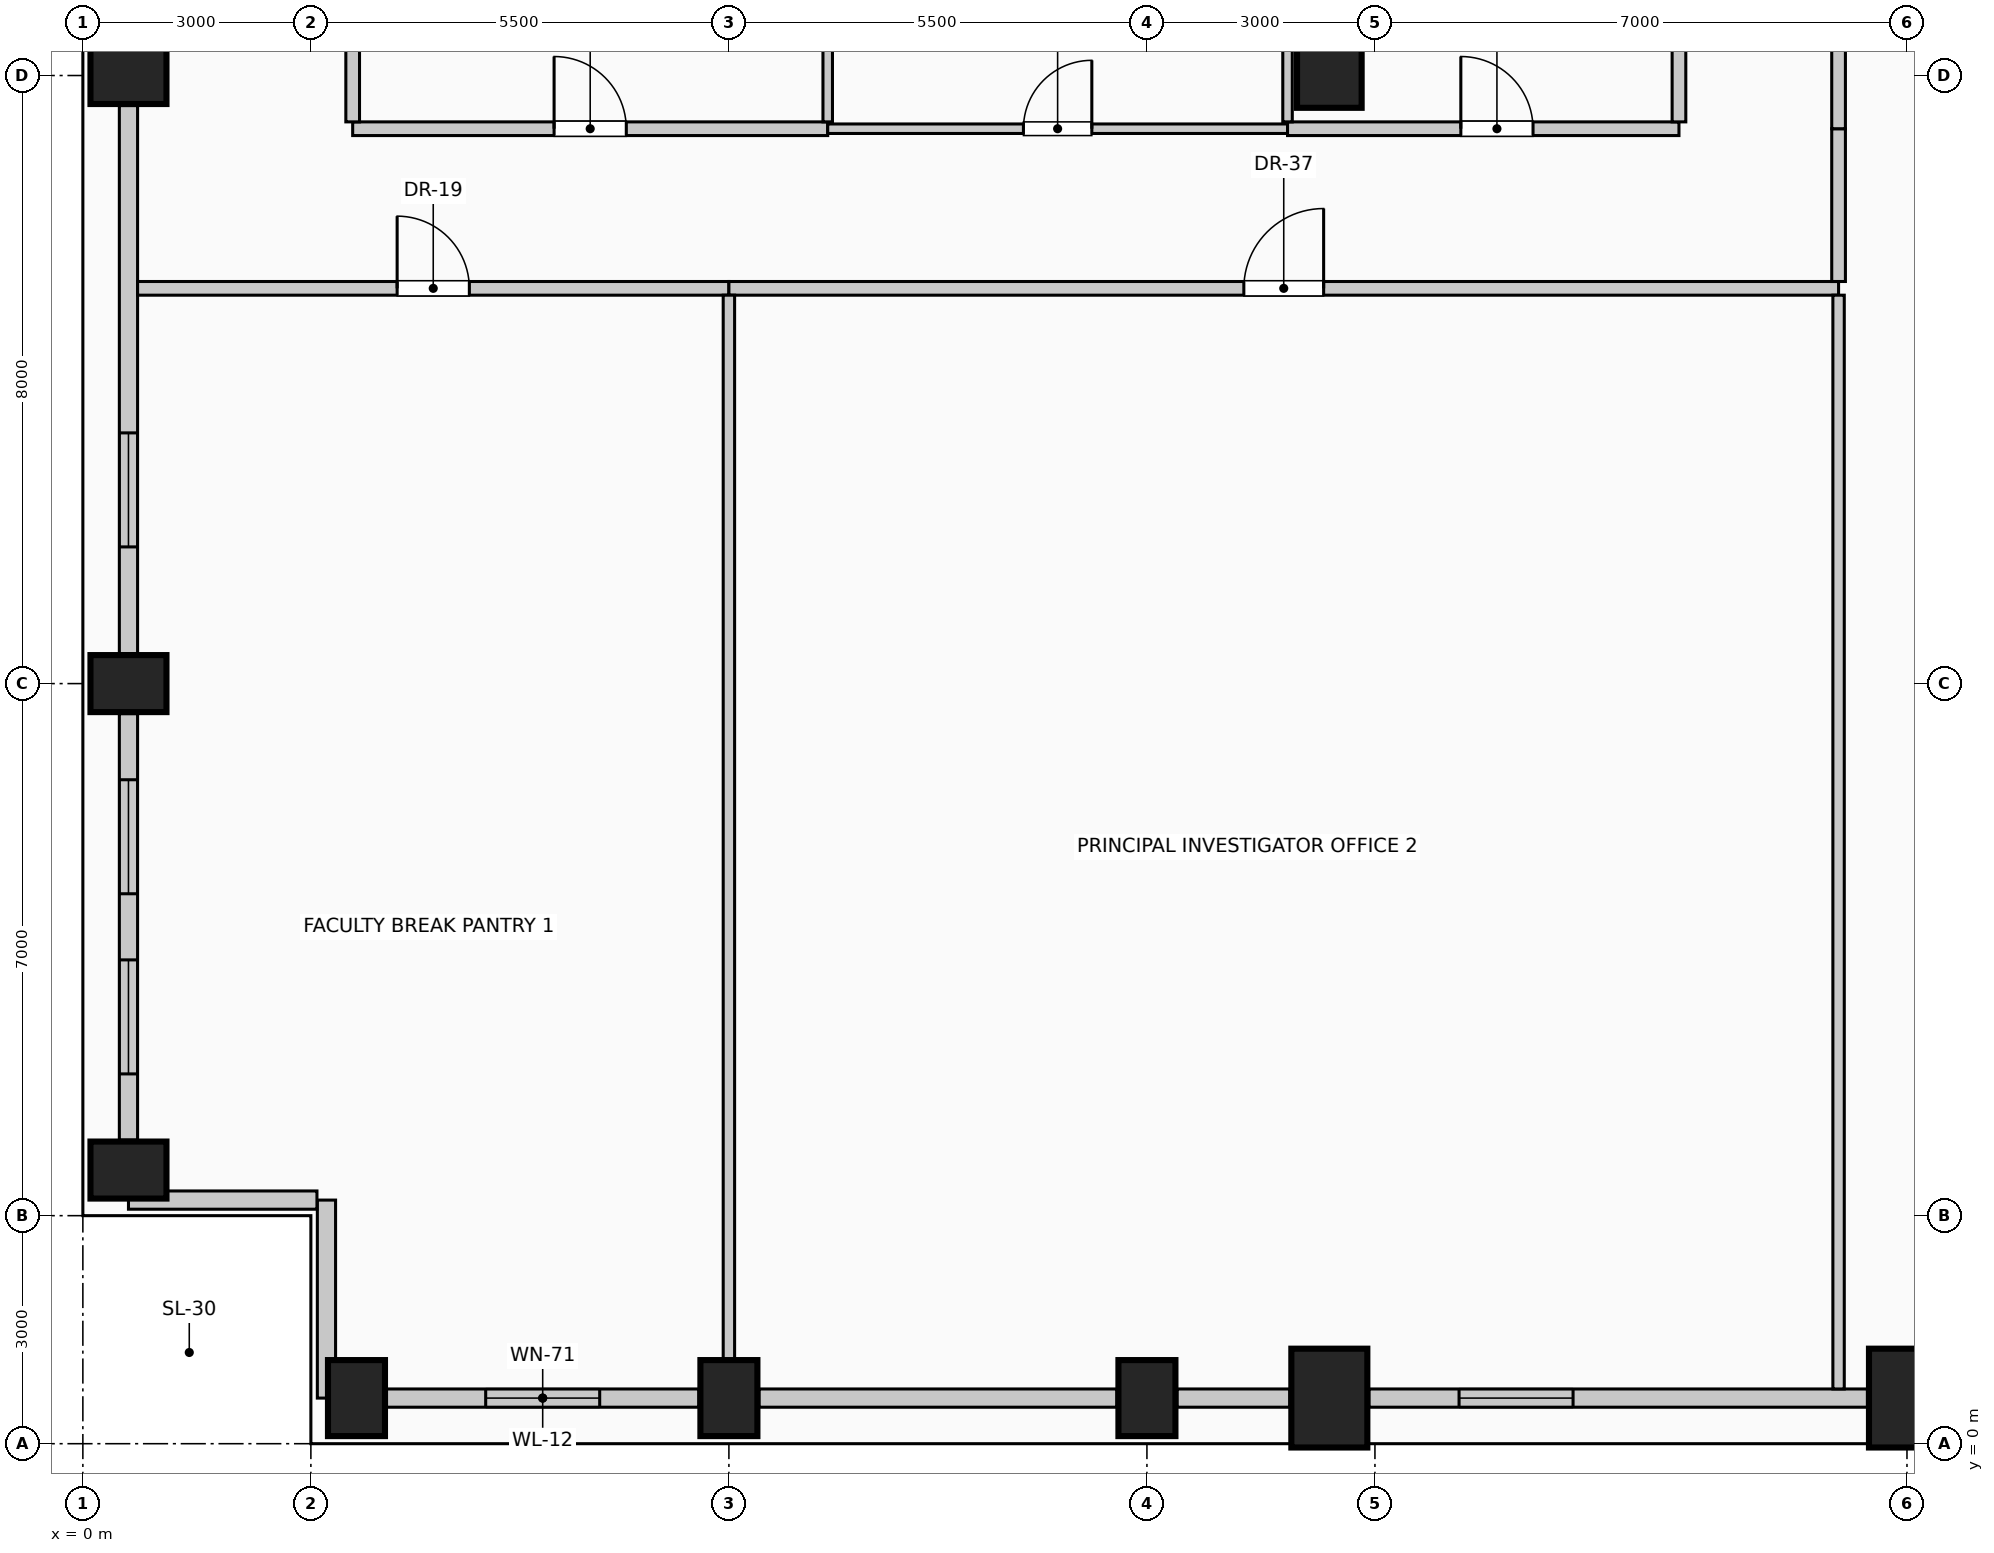
"""IFC4 building model, lengths in metres.
Left out: names, types, materials, properties, quantities, classifications, styles, units other than length and angle.
Written with IfcOpenShell. Run it as: python <this file> out.ifc"""

import sys

from ifc_helpers import new_model, si_unit, direction, frame, frame_2d, origin, origin_2d, place, context, subcontext, project, spatial, rectangle, circle, extrude, element, fill, save


model = new_model("IFC4")
c1 = context("Model", 3, precision=1e-05, world=origin(), true_north=direction((0.0, 1.0)))
c2 = subcontext(c1, "Body", "Model", "MODEL_VIEW")
j1 = project(units=[si_unit("LENGTHUNIT", "METRE"), si_unit("PLANEANGLEUNIT", "RADIAN")], contexts=[c1])
p1 = place(None, origin())
s1 = spatial("IfcSite", under=j1, at=p1, CompositionType="ELEMENT")
p2 = place(p1, origin())
s2 = spatial("IfcBuilding", under=s1, at=p2, CompositionType="ELEMENT")
p3 = place(p2, frame((0.0, 0.0, 226.6)))
s3 = spatial("IfcBuildingStorey", under=s2, at=p3, CompositionType="ELEMENT", Elevation=226.6)
for number, where, z_axis, x_axis in (
    (1, (3.6, 0.6, 0.0), (0.0, 0.0, 1.0), (1.0, 0.0, 0.0)),
    (2, (8.5, 0.6, 0.0), (0.0, 0.0, 1.0), (1.0, 0.0, 0.0)),
    (3, (14.0, 0.6, 0.0), (0.0, 0.0, 1.0), (1.0, 0.0, 0.0)),
):
    element("IfcColumn", number, at=place(p3, frame(where, z_axis=z_axis, x_axis=x_axis)), inside=s3, PredefinedType="COLUMN", context=c2, shape_type="SweptSolid", body=[
        extrude(rectangle(XDim=0.75, YDim=1.0, at=origin_2d()), origin(), (0.0, 0.0, 1.0), 4.0),
    ])
for number, where, z_axis, x_axis in (
    (4, (16.4, 0.6, 0.0), (0.0, 0.0, 1.0), (1.0, 0.0, 0.0)),
    (5, (24.0, 0.6, 0.0), (0.0, 0.0, 1.0), (1.0, 0.0, 0.0)),
):
    element("IfcColumn", number, at=place(p3, frame(where, z_axis=z_axis, x_axis=x_axis)), inside=s3, PredefinedType="COLUMN", context=c2, shape_type="SweptSolid", body=[
        extrude(rectangle(XDim=1.0, YDim=1.3, at=origin_2d()), origin(), (0.0, 0.0, 1.0), 4.0),
    ])
for number, where, z_axis, x_axis in (
    (6, (0.6, 3.6, 0.0), (0.0, 0.0, 1.0), (0.0, 1.0, 0.0)),
    (7, (0.6, 10.0, 0.0), (0.0, 0.0, 1.0), (0.0, 1.0, 0.0)),
    (8, (0.6, 18.0, 0.0), (0.0, 0.0, 1.0), (0.0, 1.0, 0.0)),
):
    element("IfcColumn", number, at=place(p3, frame(where, z_axis=z_axis, x_axis=x_axis)), inside=s3, PredefinedType="COLUMN", context=c2, shape_type="SweptSolid", body=[
        extrude(rectangle(XDim=0.75, YDim=1.0, at=origin_2d()), origin(), (0.0, 0.0, 1.0), 4.0),
    ])
p4 = place(p3, frame((16.4, 18.0, 0.0), z_axis=(0.0, 0.0, 1.0), x_axis=(1.0, 0.0, 0.0)))
e9 = element("IfcColumn", 9, at=p4, inside=s3, PredefinedType="COLUMN", context=c2, shape_type="SweptSolid", body=[
    extrude(circle(Radius=0.425, at=origin_2d()), origin(), (0.0, 0.0, 1.0), 4.0),
])
p5 = place(p3, frame((8.105, 0.6, 0.0), z_axis=(0.0, 0.0, 1.0), x_axis=(-1.0, 0.0, 0.0)))
e10 = element("IfcWall", 10, at=p5, inside=s3, PredefinedType="SOLIDWALL", context=c2, shape_type="SweptSolid", body=[
    extrude(rectangle(XDim=4.11, YDim=0.24, at=frame_2d((2.055, 0.0))), origin(), (0.0, 0.0, 1.0), 3.0),
])
p6 = place(p5, frame((1.305, 0.0, 0.42)))
e11 = element("IfcOpeningElement", 11, at=p6, cuts=e10, PredefinedType="OPENING", context=c2, shape_type="SweptSolid", body=[
    extrude(rectangle(XDim=1.5, YDim=2.2, at=frame_2d((0.75, 1.1))), frame((0.0, 0.13, 0.0), z_axis=(0.0, -1.0, 0.0), x_axis=(1.0, 0.0, 0.0)), (0.0, 0.0, 1.0), 0.26),
])
p7 = place(p3, frame((13.605, 0.6, 0.0), z_axis=(0.0, 0.0, 1.0), x_axis=(-1.0, 0.0, 0.0)))
e12 = element("IfcWall", 12, at=p7, inside=s3, PredefinedType="SOLIDWALL", context=c2, shape_type="SweptSolid", body=[
    extrude(rectangle(XDim=4.71, YDim=0.24, at=frame_2d((2.355, 0.0))), origin(), (0.0, 0.0, 1.0), 3.0),
])
p8 = place(p3, frame((15.88, 0.6, 0.0), z_axis=(0.0, 0.0, 1.0), x_axis=(-1.0, 0.0, 0.0)))
e13 = element("IfcWall", 13, at=p8, inside=s3, PredefinedType="SOLIDWALL", context=c2, shape_type="SweptSolid", body=[
    extrude(rectangle(XDim=1.485, YDim=0.24, at=frame_2d((0.742, 0.0))), origin(), (0.0, 0.0, 1.0), 3.0),
])
p9 = place(p3, frame((23.48, 0.6, 0.0), z_axis=(0.0, 0.0, 1.0), x_axis=(-1.0, 0.0, 0.0)))
e14 = element("IfcWall", 14, at=p9, inside=s3, PredefinedType="SOLIDWALL", context=c2, shape_type="SweptSolid", body=[
    extrude(rectangle(XDim=6.56, YDim=0.24, at=frame_2d((3.28, 0.0))), origin(), (0.0, 0.0, 1.0), 3.0),
])
p10 = place(p9, frame((3.873, 0.0, 0.42)))
e15 = element("IfcOpeningElement", 15, at=p10, cuts=e14, PredefinedType="OPENING", context=c2, shape_type="SweptSolid", body=[
    extrude(rectangle(XDim=1.5, YDim=2.2, at=frame_2d((0.75, 1.1))), frame((0.0, 0.13, 0.0), z_axis=(0.0, -1.0, 0.0), x_axis=(1.0, 0.0, 0.0)), (0.0, 0.0, 1.0), 0.26),
])
p11 = place(p3, frame((0.6, 3.995, 0.0), z_axis=(0.0, 0.0, 1.0), x_axis=(0.0, 1.0, 0.0)))
e16 = element("IfcWall", 16, at=p11, inside=s3, PredefinedType="SOLIDWALL", context=c2, shape_type="SweptSolid", body=[
    extrude(rectangle(XDim=5.61, YDim=0.24, at=frame_2d((2.805, 0.0))), origin(), (0.0, 0.0, 1.0), 3.0),
])
p12 = place(p11, frame((0.87, 0.0, 0.42)))
e17 = element("IfcOpeningElement", 17, at=p12, cuts=e16, PredefinedType="OPENING", context=c2, shape_type="SweptSolid", body=[
    extrude(rectangle(XDim=1.5, YDim=2.2, at=frame_2d((0.75, 1.1))), frame((0.0, 0.13, 0.0), z_axis=(0.0, -1.0, 0.0), x_axis=(1.0, 0.0, 0.0)), (0.0, 0.0, 1.0), 0.26),
])
p13 = place(p11, frame((3.24, 0.0, 0.42)))
e18 = element("IfcOpeningElement", 18, at=p13, cuts=e16, PredefinedType="OPENING", context=c2, shape_type="SweptSolid", body=[
    extrude(rectangle(XDim=1.5, YDim=2.2, at=frame_2d((0.75, 1.1))), frame((0.0, 0.13, 0.0), z_axis=(0.0, -1.0, 0.0), x_axis=(1.0, 0.0, 0.0)), (0.0, 0.0, 1.0), 0.26),
])
p14 = place(p3, frame((0.6, 10.395, 0.0), z_axis=(0.0, 0.0, 1.0), x_axis=(0.0, 1.0, 0.0)))
e19 = element("IfcWall", 19, at=p14, inside=s3, PredefinedType="SOLIDWALL", context=c2, shape_type="SweptSolid", body=[
    extrude(rectangle(XDim=7.21, YDim=0.24, at=frame_2d((3.605, 0.0))), origin(), (0.0, 0.0, 1.0), 3.0),
])
p15 = place(p14, frame((1.403, 0.0, 0.42)))
e20 = element("IfcOpeningElement", 20, at=p15, cuts=e19, PredefinedType="OPENING", context=c2, shape_type="SweptSolid", body=[
    extrude(rectangle(XDim=1.5, YDim=2.2, at=frame_2d((0.75, 1.1))), frame((0.0, 0.13, 0.0), z_axis=(0.0, -1.0, 0.0), x_axis=(1.0, 0.0, 0.0)), (0.0, 0.0, 1.0), 0.26),
])
p16 = place(p3, frame((3.205, 0.6, 0.0), z_axis=(0.0, 0.0, 1.0), x_axis=(0.0, 1.0, 0.0)))
e21 = element("IfcWall", 21, at=p16, inside=s3, PredefinedType="SOLIDWALL", context=c2, shape_type="SweptSolid", body=[
    extrude(rectangle(XDim=2.605, YDim=0.24, at=frame_2d((1.302, 0.0))), origin(), (0.0, 0.0, 1.0), 3.75),
])
p17 = place(p3, frame((3.08, 3.205, 0.0), z_axis=(0.0, 0.0, 1.0), x_axis=(-1.0, 0.0, 0.0)))
e22 = element("IfcWall", 22, at=p17, inside=s3, PredefinedType="SOLIDWALL", context=c2, shape_type="SweptSolid", body=[
    extrude(rectangle(XDim=2.48, YDim=0.24, at=frame_2d((1.24, 0.0))), origin(), (0.0, 0.0, 1.0), 3.75),
])
p18 = place(p3, frame((0.72, 15.2, 0.0), z_axis=(0.0, 0.0, 1.0), x_axis=(1.0, 0.0, 0.0)))
e23 = element("IfcWall", 23, at=p18, inside=s3, PredefinedType="PARTITIONING", context=c2, shape_type="SweptSolid", body=[
    extrude(rectangle(XDim=7.78, YDim=0.18, at=frame_2d((3.89, 0.0))), origin(), (0.0, 0.0, 1.0), 3.75),
])
p19 = place(p18, frame((3.415, 0.0, 0.0)))
e24 = element("IfcOpeningElement", 24, at=p19, cuts=e23, PredefinedType="OPENING", context=c2, shape_type="SweptSolid", body=[
    extrude(rectangle(XDim=0.95, YDim=2.15, at=frame_2d((0.475, 1.075))), frame((0.0, 0.1, 0.0), z_axis=(0.0, -1.0, 0.0), x_axis=(1.0, 0.0, 0.0)), (0.0, 0.0, 1.0), 0.2),
])
p20 = place(p3, frame((8.5, 15.2, 0.0), z_axis=(0.0, 0.0, 1.0), x_axis=(1.0, 0.0, 0.0)))
e25 = element("IfcWall", 25, at=p20, inside=s3, PredefinedType="PARTITIONING", context=c2, shape_type="SweptSolid", body=[
    extrude(rectangle(XDim=14.6, YDim=0.18, at=frame_2d((7.3, 0.0))), origin(), (0.0, 0.0, 1.0), 3.75),
])
p21 = place(p20, frame((6.775, 0.0, 0.0)))
e26 = element("IfcOpeningElement", 26, at=p21, cuts=e25, PredefinedType="OPENING", context=c2, shape_type="SweptSolid", body=[
    extrude(rectangle(XDim=1.05, YDim=2.15, at=frame_2d((0.525, 1.075))), frame((0.0, 0.1, 0.0), z_axis=(0.0, -1.0, 0.0), x_axis=(1.0, 0.0, 0.0)), (0.0, 0.0, 1.0), 0.2),
])
p22 = place(p3, frame((3.55, 17.3, 0.0), z_axis=(0.0, 0.0, 1.0), x_axis=(1.0, 0.0, 0.0)))
e27 = element("IfcWall", 27, at=p22, inside=s3, PredefinedType="PARTITIONING", context=c2, shape_type="SweptSolid", body=[
    extrude(rectangle(XDim=6.25, YDim=0.18, at=frame_2d((3.125, 0.0))), origin(), (0.0, 0.0, 1.0), 3.75),
])
p23 = place(p22, frame((2.65, 0.0, 0.0)))
e28 = element("IfcOpeningElement", 28, at=p23, cuts=e27, PredefinedType="OPENING", context=c2, shape_type="SweptSolid", body=[
    extrude(rectangle(XDim=0.95, YDim=2.15, at=frame_2d((0.475, 1.075))), frame((0.0, 0.1, 0.0), z_axis=(0.0, -1.0, 0.0), x_axis=(1.0, 0.0, 0.0)), (0.0, 0.0, 1.0), 0.2),
])
p24 = place(p3, frame((9.8, 17.3, 0.0), z_axis=(0.0, 0.0, 1.0), x_axis=(1.0, 0.0, 0.0)))
e29 = element("IfcWall", 29, at=p24, inside=s3, PredefinedType="PARTITIONING", context=c2, shape_type="SweptSolid", body=[
    extrude(rectangle(XDim=6.05, YDim=0.125, at=frame_2d((3.025, 0.0))), origin(), (0.0, 0.0, 1.0), 3.75),
])
p25 = place(p24, frame((2.575, 0.0, 0.0)))
e30 = element("IfcOpeningElement", 30, at=p25, cuts=e29, PredefinedType="OPENING", context=c2, shape_type="SweptSolid", body=[
    extrude(rectangle(XDim=0.9, YDim=2.1, at=frame_2d((0.45, 1.05))), frame((0.0, 0.073, 0.0), z_axis=(0.0, -1.0, 0.0), x_axis=(1.0, 0.0, 0.0)), (0.0, 0.0, 1.0), 0.145),
])
p26 = place(p3, frame((15.85, 17.3, 0.0), z_axis=(0.0, 0.0, 1.0), x_axis=(1.0, 0.0, 0.0)))
e31 = element("IfcWall", 31, at=p26, inside=s3, PredefinedType="PARTITIONING", context=c2, shape_type="SweptSolid", body=[
    extrude(rectangle(XDim=5.15, YDim=0.18, at=frame_2d((2.575, 0.0))), origin(), (0.0, 0.0, 1.0), 3.75),
])
p27 = place(p26, frame((2.28, 0.0, 0.0)))
e32 = element("IfcOpeningElement", 32, at=p27, cuts=e31, PredefinedType="OPENING", context=c2, shape_type="SweptSolid", body=[
    extrude(rectangle(XDim=0.95, YDim=2.15, at=frame_2d((0.475, 1.075))), frame((0.0, 0.1, 0.0), z_axis=(0.0, -1.0, 0.0), x_axis=(1.0, 0.0, 0.0)), (0.0, 0.0, 1.0), 0.2),
])
p28 = place(p3, frame((3.55, 17.39, 0.0), z_axis=(0.0, 0.0, 1.0), x_axis=(0.0, 1.0, 0.0)))
e33 = element("IfcWall", 33, at=p28, inside=s3, PredefinedType="PARTITIONING", context=c2, shape_type="SweptSolid", body=[
    extrude(rectangle(XDim=7.335, YDim=0.18, at=frame_2d((3.667, 0.0))), origin(), (0.0, 0.0, 1.0), 3.75),
])
p29 = place(p3, frame((8.5, 1.1, 0.0), z_axis=(0.0, 0.0, 1.0), x_axis=(0.0, 1.0, 0.0)))
e34 = element("IfcWall", 34, at=p29, inside=s3, PredefinedType="PARTITIONING", context=c2, shape_type="SweptSolid", body=[
    extrude(rectangle(XDim=14.01, YDim=0.15, at=frame_2d((7.005, 0.0))), origin(), (0.0, 0.0, 1.0), 3.75),
])
for number, where, z_axis, x_axis in (
    (35, (9.8, 17.39, 0.0), (0.0, 0.0, 1.0), (0.0, 1.0, 0.0)),
    (36, (15.85, 17.39, 0.0), (0.0, 0.0, 1.0), (0.0, 1.0, 0.0)),
):
    element("IfcWall", number, at=place(p3, frame(where, z_axis=z_axis, x_axis=x_axis)), inside=s3, PredefinedType="PARTITIONING", context=c2, shape_type="SweptSolid", body=[
        extrude(rectangle(XDim=7.335, YDim=0.125, at=frame_2d((3.667, 0.0))), origin(), (0.0, 0.0, 1.0), 3.75),
    ])
p30 = place(p3, frame((21.0, 17.39, 0.0), z_axis=(0.0, 0.0, 1.0), x_axis=(0.0, 1.0, 0.0)))
e37 = element("IfcWall", 37, at=p30, inside=s3, PredefinedType="PARTITIONING", context=c2, shape_type="SweptSolid", body=[
    extrude(rectangle(XDim=7.335, YDim=0.18, at=frame_2d((3.667, 0.0))), origin(), (0.0, 0.0, 1.0), 3.75),
])
p31 = place(p3, frame((23.1, 0.72, 0.0), z_axis=(0.0, 0.0, 1.0), x_axis=(0.0, 1.0, 0.0)))
e38 = element("IfcWall", 38, at=p31, inside=s3, PredefinedType="PARTITIONING", context=c2, shape_type="SweptSolid", body=[
    extrude(rectangle(XDim=14.39, YDim=0.15, at=frame_2d((7.195, 0.0))), origin(), (0.0, 0.0, 1.0), 3.75),
])
p32 = place(p3, frame((23.1, 15.29, 0.0), z_axis=(0.0, 0.0, 1.0), x_axis=(0.0, 1.0, 0.0)))
e39 = element("IfcWall", 39, at=p32, inside=s3, PredefinedType="PARTITIONING", context=c2, shape_type="SweptSolid", body=[
    extrude(rectangle(XDim=2.01, YDim=0.18, at=frame_2d((1.005, 0.0))), origin(), (0.0, 0.0, 1.0), 3.75),
])
p33 = place(p3, frame((23.1, 17.3, 0.0), z_axis=(0.0, 0.0, 1.0), x_axis=(0.0, 1.0, 0.0)))
e40 = element("IfcWall", 40, at=p33, inside=s3, PredefinedType="PARTITIONING", context=c2, shape_type="SweptSolid", body=[
    extrude(rectangle(XDim=9.51, YDim=0.18, at=frame_2d((4.755, 0.0))), origin(), (0.0, 0.0, 1.0), 3.75),
])
p34 = place(p6, origin())
e41 = element("IfcWindow", 41, at=p34, inside=s3, PartitioningType="SINGLE_PANEL", PredefinedType="WINDOW", context=c2, shape_type="SweptSolid", body=[
    extrude(rectangle(XDim=1.5, YDim=2.2, at=frame_2d((0.75, 1.1))), frame((0.0, 0.03, 0.0), z_axis=(0.0, -1.0, 0.0), x_axis=(1.0, 0.0, 0.0)), (0.0, 0.0, 1.0), 0.06),
])
fill(e11, e41)
p35 = place(p10, origin())
e42 = element("IfcWindow", 42, at=p35, inside=s3, PartitioningType="SINGLE_PANEL", PredefinedType="WINDOW", context=c2, shape_type="SweptSolid", body=[
    extrude(rectangle(XDim=1.5, YDim=2.2, at=frame_2d((0.75, 1.1))), frame((0.0, 0.03, 0.0), z_axis=(0.0, -1.0, 0.0), x_axis=(1.0, 0.0, 0.0)), (0.0, 0.0, 1.0), 0.06),
])
fill(e15, e42)
p36 = place(p12, origin())
e43 = element("IfcWindow", 43, at=p36, inside=s3, PartitioningType="SINGLE_PANEL", PredefinedType="WINDOW", context=c2, shape_type="SweptSolid", body=[
    extrude(rectangle(XDim=1.5, YDim=2.2, at=frame_2d((0.75, 1.1))), frame((0.0, 0.03, 0.0), z_axis=(0.0, -1.0, 0.0), x_axis=(1.0, 0.0, 0.0)), (0.0, 0.0, 1.0), 0.06),
])
fill(e17, e43)
p37 = place(p13, origin())
e44 = element("IfcWindow", 44, at=p37, inside=s3, PartitioningType="SINGLE_PANEL", PredefinedType="WINDOW", context=c2, shape_type="SweptSolid", body=[
    extrude(rectangle(XDim=1.5, YDim=2.2, at=frame_2d((0.75, 1.1))), frame((0.0, 0.03, 0.0), z_axis=(0.0, -1.0, 0.0), x_axis=(1.0, 0.0, 0.0)), (0.0, 0.0, 1.0), 0.06),
])
fill(e18, e44)
p38 = place(p15, origin())
e45 = element("IfcWindow", 45, at=p38, inside=s3, PartitioningType="SINGLE_PANEL", PredefinedType="WINDOW", context=c2, shape_type="SweptSolid", body=[
    extrude(rectangle(XDim=1.5, YDim=2.2, at=frame_2d((0.75, 1.1))), frame((0.0, 0.03, 0.0), z_axis=(0.0, -1.0, 0.0), x_axis=(1.0, 0.0, 0.0)), (0.0, 0.0, 1.0), 0.06),
])
fill(e20, e45)
p39 = place(p19, origin())
e46 = element("IfcDoor", 46, at=p39, inside=s3, OperationType="SINGLE_SWING_LEFT", PredefinedType="DOOR", context=c2, shape_type="SweptSolid", body=[
    extrude(rectangle(XDim=0.95, YDim=2.15, at=frame_2d((0.475, 1.075))), frame((0.0, 0.025, 0.0), z_axis=(0.0, -1.0, 0.0), x_axis=(1.0, 0.0, 0.0)), (0.0, 0.0, 1.0), 0.05),
])
fill(e24, e46)
p40 = place(p21, origin())
e47 = element("IfcDoor", 47, at=p40, inside=s3, OperationType="SINGLE_SWING_RIGHT", PredefinedType="DOOR", context=c2, shape_type="SweptSolid", body=[
    extrude(rectangle(XDim=1.05, YDim=2.15, at=frame_2d((0.525, 1.075))), frame((0.0, 0.025, 0.0), z_axis=(0.0, -1.0, 0.0), x_axis=(1.0, 0.0, 0.0)), (0.0, 0.0, 1.0), 0.05),
])
fill(e26, e47)
p41 = place(p23, origin())
e48 = element("IfcDoor", 48, at=p41, inside=s3, OperationType="SINGLE_SWING_LEFT", PredefinedType="DOOR", context=c2, shape_type="SweptSolid", body=[
    extrude(rectangle(XDim=0.95, YDim=2.15, at=frame_2d((0.475, 1.075))), frame((0.0, 0.025, 0.0), z_axis=(0.0, -1.0, 0.0), x_axis=(1.0, 0.0, 0.0)), (0.0, 0.0, 1.0), 0.05),
])
fill(e28, e48)
p42 = place(p25, origin())
e49 = element("IfcDoor", 49, at=p42, inside=s3, OperationType="SINGLE_SWING_RIGHT", PredefinedType="DOOR", context=c2, shape_type="SweptSolid", body=[
    extrude(rectangle(XDim=0.9, YDim=2.1, at=frame_2d((0.45, 1.05))), frame((0.0, 0.025, 0.0), z_axis=(0.0, -1.0, 0.0), x_axis=(1.0, 0.0, 0.0)), (0.0, 0.0, 1.0), 0.05),
])
fill(e30, e49)
p43 = place(p27, origin())
e50 = element("IfcDoor", 50, at=p43, inside=s3, OperationType="SINGLE_SWING_LEFT", PredefinedType="DOOR", context=c2, shape_type="SweptSolid", body=[
    extrude(rectangle(XDim=0.95, YDim=2.15, at=frame_2d((0.475, 1.075))), frame((0.0, 0.025, 0.0), z_axis=(0.0, -1.0, 0.0), x_axis=(1.0, 0.0, 0.0)), (0.0, 0.0, 1.0), 0.05),
])
fill(e32, e50)
save(model, sys.argv[1])
